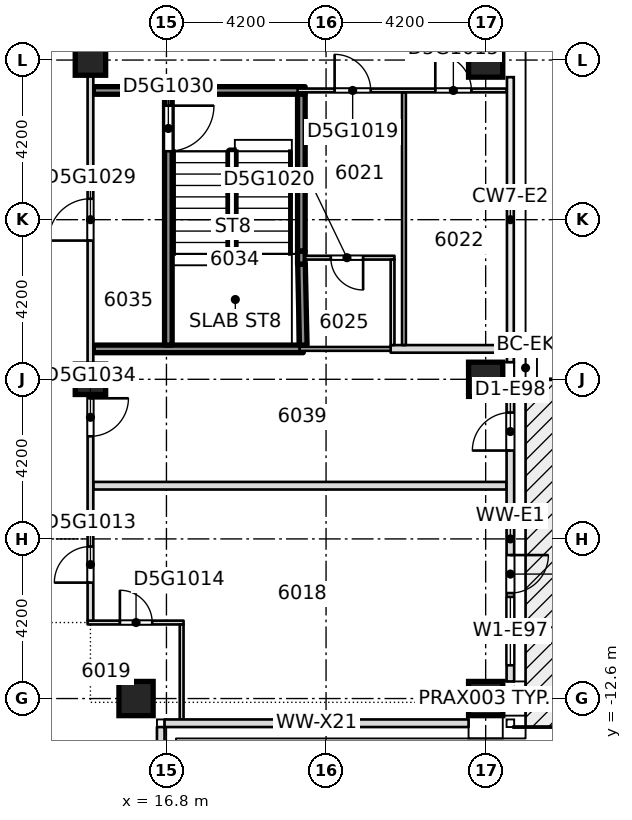
"""IFC4 building model, lengths in metres.
Left out: names, types, materials, properties, quantities, classifications, styles, units other than length and angle.
Written with IfcOpenShell. Run it as: python <this file> out.ifc"""

import sys

from ifc_helpers import new_model, si_unit, direction, frame, frame_2d, origin, origin_2d, place, context, subcontext, project, spatial, rectangle, extrude, element, fill, save


model = new_model("IFC4")
c1 = context("Model", 3, precision=1e-05, world=origin(), true_north=direction((0.0, 1.0)))
c2 = subcontext(c1, "Body", "Model", "MODEL_VIEW")
j1 = project(units=[si_unit("LENGTHUNIT", "METRE"), si_unit("PLANEANGLEUNIT", "RADIAN")], contexts=[c1])
p1 = place(None, origin())
s1 = spatial("IfcSite", under=j1, at=p1, CompositionType="ELEMENT")
p2 = place(p1, origin())
s2 = spatial("IfcBuilding", under=s1, at=p2, CompositionType="ELEMENT")
p3 = place(p2, frame((0.0, 0.0, 230.35)))
s3 = spatial("IfcBuildingStorey", under=s2, at=p3, CompositionType="ELEMENT", Elevation=230.35)
for number, where, z_axis, x_axis in (
    (1, (16.0, -12.6, -0.4), (0.0, 0.0, 1.0), (1.0, 0.0, 0.0)),
    (2, (25.2, -12.6, -0.4), (0.0, 0.0, 1.0), (1.0, 0.0, 0.0)),
    (3, (25.2, -4.2, -0.4), (0.0, 0.0, 1.0), (1.0, 0.0, 0.0)),
    (4, (25.2, 4.2, -0.4), (0.0, 0.0, 1.0), (1.0, 0.0, 0.0)),
):
    element("IfcColumn", number, at=place(p3, frame(where, z_axis=z_axis, x_axis=x_axis)), inside=s3, PredefinedType="COLUMN", context=c2, shape_type="SweptSolid", body=[
        extrude(rectangle(XDim=0.9, YDim=0.9, at=origin_2d()), origin(), (0.0, 0.0, 1.0), 3.45),
    ])
for number, where, z_axis, x_axis in (
    (5, (14.8, -4.2, -0.4), (0.0, 0.0, 1.0), (1.0, 0.0, 0.0)),
    (6, (14.8, 4.2, -0.4), (0.0, 0.0, 1.0), (1.0, 0.0, 0.0)),
):
    element("IfcColumn", number, at=place(p3, frame(where, z_axis=z_axis, x_axis=x_axis)), inside=s3, PredefinedType="COLUMN", context=c2, shape_type="SweptSolid", body=[
        extrude(rectangle(XDim=0.8, YDim=0.8, at=origin_2d()), origin(), (0.0, 0.0, 1.0), 3.45),
    ])
p4 = place(p3, frame((14.725, -10.6, 0.0), z_axis=(0.0, 0.0, 1.0), x_axis=(1.0, 0.0, 0.0)))
e7 = element("IfcWall", 7, at=p4, inside=s3, PredefinedType="PARTITIONING", context=c2, shape_type="SweptSolid", body=[
    extrude(rectangle(XDim=2.525, YDim=0.1, at=frame_2d((1.262, 0.0))), origin(), (0.0, 0.0, 1.0), 3.05),
])
p5 = place(p4, frame((0.85, 0.0, 0.0)))
e8 = element("IfcOpeningElement", 8, at=p5, cuts=e7, PredefinedType="OPENING", context=c2, shape_type="SweptSolid", body=[
    extrude(rectangle(XDim=0.85, YDim=2.1, at=frame_2d((0.425, 1.05))), frame((0.0, 0.06, 0.0), z_axis=(0.0, -1.0, 0.0), x_axis=(1.0, 0.0, 0.0)), (0.0, 0.0, 1.0), 0.12),
])
p6 = place(p3, frame((14.875, -7.0, 0.0), z_axis=(0.0, 0.0, 1.0), x_axis=(1.0, 0.0, 0.0)))
e9 = element("IfcWall", 9, at=p6, inside=s3, PredefinedType="PARTITIONING", context=c2, shape_type="SweptSolid", body=[
    extrude(rectangle(XDim=10.875, YDim=0.2, at=frame_2d((5.438, 0.0))), origin(), (0.0, 0.0, 1.0), 3.05),
])
p7 = place(p3, frame((14.875, -3.4, 0.0), z_axis=(0.0, 0.0, 1.0), x_axis=(1.0, 0.0, 0.0)))
e10 = element("IfcWall", 10, at=p7, inside=s3, PredefinedType="SOLIDWALL", context=c2, shape_type="SweptSolid", body=[
    extrude(rectangle(XDim=5.525, YDim=0.2, at=frame_2d((2.762, 0.0))), origin(), (0.0, 0.0, 1.0), 3.05),
])
p8 = place(p3, frame((20.3, -3.4, 0.0), z_axis=(0.0, 0.0, 1.0), x_axis=(1.0, 0.0, 0.0)))
e11 = element("IfcWall", 11, at=p8, inside=s3, PredefinedType="PARTITIONING", context=c2, shape_type="SweptSolid", body=[
    extrude(rectangle(XDim=2.5, YDim=0.1, at=frame_2d((1.25, 0.0))), origin(), (0.0, 0.0, 1.0), 3.05),
])
p9 = place(p3, frame((22.7, -3.4, 0.0), z_axis=(0.0, 0.0, 1.0), x_axis=(1.0, 0.0, 0.0)))
e12 = element("IfcWall", 12, at=p9, inside=s3, PredefinedType="PARTITIONING", context=c2, shape_type="SweptSolid", body=[
    extrude(rectangle(XDim=3.05, YDim=0.2, at=frame_2d((1.525, 0.0))), origin(), (0.0, 0.0, 1.0), 3.05),
])
p10 = place(p3, frame((20.45, -1.0, 0.0), z_axis=(0.0, 0.0, 1.0), x_axis=(1.0, 0.0, 0.0)))
e13 = element("IfcWall", 13, at=p10, inside=s3, PredefinedType="PARTITIONING", context=c2, shape_type="SweptSolid", body=[
    extrude(rectangle(XDim=2.35, YDim=0.1, at=frame_2d((1.175, 0.0))), origin(), (0.0, 0.0, 1.0), 3.05),
])
p11 = place(p10, frame((0.675, 0.0, 0.0)))
e14 = element("IfcOpeningElement", 14, at=p11, cuts=e13, PredefinedType="OPENING", context=c2, shape_type="SweptSolid", body=[
    extrude(rectangle(XDim=0.85, YDim=2.1, at=frame_2d((0.425, 1.05))), frame((0.0, 0.06, 0.0), z_axis=(0.0, -1.0, 0.0), x_axis=(1.0, 0.0, 0.0)), (0.0, 0.0, 1.0), 0.12),
])
p12 = place(p3, frame((14.875, 3.4, 0.0), z_axis=(0.0, 0.0, 1.0), x_axis=(1.0, 0.0, 0.0)))
e15 = element("IfcWall", 15, at=p12, inside=s3, PredefinedType="SOLIDWALL", context=c2, shape_type="SweptSolid", body=[
    extrude(rectangle(XDim=5.575, YDim=0.2, at=frame_2d((2.788, 0.0))), origin(), (0.0, 0.0, 1.0), 3.05),
])
p13 = place(p3, frame((20.25, 3.4, 0.0), z_axis=(0.0, 0.0, 1.0), x_axis=(1.0, 0.0, 0.0)))
e16 = element("IfcWall", 16, at=p13, inside=s3, PredefinedType="PARTITIONING", context=c2, shape_type="SweptSolid", body=[
    extrude(rectangle(XDim=5.5, YDim=0.1, at=frame_2d((2.75, 0.0))), origin(), (0.0, 0.0, 1.0), 3.05),
])
p14 = place(p13, frame((3.625, 0.0, 0.0)))
e17 = element("IfcOpeningElement", 17, at=p14, cuts=e16, PredefinedType="OPENING", context=c2, shape_type="SweptSolid", body=[
    extrude(rectangle(XDim=0.95, YDim=2.1, at=frame_2d((0.475, 1.05))), frame((0.0, 0.06, 0.0), z_axis=(0.0, -1.0, 0.0), x_axis=(1.0, 0.0, 0.0)), (0.0, 0.0, 1.0), 0.12),
])
p15 = place(p13, frame((0.975, 0.0, 0.0)))
e18 = element("IfcOpeningElement", 18, at=p15, cuts=e16, PredefinedType="OPENING", context=c2, shape_type="SweptSolid", body=[
    extrude(rectangle(XDim=0.95, YDim=2.1, at=frame_2d((0.475, 1.05))), frame((0.0, 0.06, 0.0), z_axis=(0.0, -1.0, 0.0), x_axis=(1.0, 0.0, 0.0)), (0.0, 0.0, 1.0), 0.12),
])
p16 = place(p3, frame((14.8, -10.55, 0.0), z_axis=(0.0, 0.0, 1.0), x_axis=(0.0, 1.0, 0.0)))
e19 = element("IfcWall", 19, at=p16, inside=s3, PredefinedType="PARTITIONING", context=c2, shape_type="SweptSolid", body=[
    extrude(rectangle(XDim=20.975, YDim=0.15, at=frame_2d((10.488, 0.0))), origin(), (0.0, 0.0, 1.0), 3.05),
])
p17 = place(p16, frame((1.0, 0.0, 0.0)))
e20 = element("IfcOpeningElement", 20, at=p17, cuts=e19, PredefinedType="OPENING", context=c2, shape_type="SweptSolid", body=[
    extrude(rectangle(XDim=0.95, YDim=2.1, at=frame_2d((0.475, 1.05))), frame((0.0, 0.085, 0.0), z_axis=(0.0, -1.0, 0.0), x_axis=(1.0, 0.0, 0.0)), (0.0, 0.0, 1.0), 0.17),
])
p18 = place(p16, frame((17.0, 0.0, 0.0)))
e21 = element("IfcOpeningElement", 21, at=p18, cuts=e19, PredefinedType="OPENING", context=c2, shape_type="SweptSolid", body=[
    extrude(rectangle(XDim=1.0, YDim=2.1, at=frame_2d((0.5, 1.05))), frame((0.0, 0.085, 0.0), z_axis=(0.0, -1.0, 0.0), x_axis=(1.0, 0.0, 0.0)), (0.0, 0.0, 1.0), 0.17),
])
p19 = place(p16, frame((10.0, 0.0, 0.0)))
e22 = element("IfcOpeningElement", 22, at=p19, cuts=e19, PredefinedType="OPENING", context=c2, shape_type="SweptSolid", body=[
    extrude(rectangle(XDim=1.1, YDim=2.1, at=frame_2d((0.55, 1.05))), frame((0.0, 0.085, 0.0), z_axis=(0.0, -1.0, 0.0), x_axis=(1.0, 0.0, 0.0)), (0.0, 0.0, 1.0), 0.17),
])
p20 = place(p16, frame((4.85, 0.0, 0.0)))
e23 = element("IfcOpeningElement", 23, at=p20, cuts=e19, PredefinedType="OPENING", context=c2, shape_type="SweptSolid", body=[
    extrude(rectangle(XDim=1.0, YDim=2.1, at=frame_2d((0.5, 1.05))), frame((0.0, 0.085, 0.0), z_axis=(0.0, -1.0, 0.0), x_axis=(1.0, 0.0, 0.0)), (0.0, 0.0, 1.0), 0.17),
])
p21 = place(p3, frame((16.85, -3.3, 0.0), z_axis=(0.0, 0.0, 1.0), x_axis=(0.0, 1.0, 0.0)))
e24 = element("IfcWall", 24, at=p21, inside=s3, PredefinedType="SOLIDWALL", context=c2, shape_type="SweptSolid", body=[
    extrude(rectangle(XDim=6.6, YDim=0.2, at=frame_2d((3.3, 0.0))), origin(), (0.0, 0.0, 1.0), 3.05),
])
p22 = place(p21, frame((5.1, 0.0, 0.0)))
e25 = element("IfcOpeningElement", 25, at=p22, cuts=e24, PredefinedType="OPENING", context=c2, shape_type="SweptSolid", body=[
    extrude(rectangle(XDim=1.2, YDim=2.1, at=frame_2d((0.6, 1.05))), frame((0.0, 0.11, 0.0), z_axis=(0.0, -1.0, 0.0), x_axis=(1.0, 0.0, 0.0)), (0.0, 0.0, 1.0), 0.22),
])
p23 = place(p3, frame((17.2, -13.15, 0.0), z_axis=(0.0, 0.0, 1.0), x_axis=(0.0, 1.0, 0.0)))
e26 = element("IfcWall", 26, at=p23, inside=s3, PredefinedType="PARTITIONING", context=c2, shape_type="SweptSolid", body=[
    extrude(rectangle(XDim=2.5, YDim=0.1, at=frame_2d((1.25, 0.0))), origin(), (0.0, 0.0, 1.0), 3.05),
])
p24 = place(p3, frame((20.4, -3.3, 0.0), z_axis=(0.0, 0.0, 1.0), x_axis=(-0.021771342749, 0.999762976227, 0.0)))
e27 = element("IfcWall", 27, at=p24, inside=s3, PredefinedType="SOLIDWALL", context=c2, shape_type="SweptSolid", body=[
    extrude(rectangle(XDim=2.131, YDim=0.2, at=frame_2d((1.065, 0.0))), origin(), (0.0, 0.0, 1.0), 3.05),
])
p25 = place(p3, frame((20.35, -0.83, 0.0), z_axis=(0.0, 0.0, 1.0), x_axis=(0.0, 1.0, 0.0)))
e28 = element("IfcWall", 28, at=p25, inside=s3, PredefinedType="SOLIDWALL", context=c2, shape_type="SweptSolid", body=[
    extrude(rectangle(XDim=4.13, YDim=0.2, at=frame_2d((2.065, 0.0))), origin(), (0.0, 0.0, 1.0), 3.05),
])
p26 = place(p3, frame((22.75, -3.3, 0.0), z_axis=(0.0, 0.0, 1.0), x_axis=(0.0, 1.0, 0.0)))
e29 = element("IfcWall", 29, at=p26, inside=s3, PredefinedType="PARTITIONING", context=c2, shape_type="SweptSolid", body=[
    extrude(rectangle(XDim=2.25, YDim=0.1, at=frame_2d((1.125, 0.0))), origin(), (0.0, 0.0, 1.0), 3.05),
])
p27 = place(p3, frame((23.05, -3.3, 0.0), z_axis=(0.0, 0.0, 1.0), x_axis=(0.0, 1.0, 0.0)))
e30 = element("IfcWall", 30, at=p27, inside=s3, PredefinedType="PARTITIONING", context=c2, shape_type="SweptSolid", body=[
    extrude(rectangle(XDim=6.65, YDim=0.1, at=frame_2d((3.325, 0.0))), origin(), (0.0, 0.0, 1.0), 3.05),
])
p28 = place(p3, frame((16.65, -20.55, 0.0), z_axis=(0.0, 0.0, 1.0), x_axis=(0.0, 1.0, 0.0)))
e31 = element("IfcWall", 31, at=p28, inside=s3, PredefinedType="STANDARD", context=c2, shape_type="SweptSolid", body=[
    extrude(rectangle(XDim=7.2, YDim=0.2, at=frame_2d((3.6, 0.0))), origin(), (0.0, 0.0, 1.0), 3.05),
])
p29 = place(p28, frame((0.425, 0.0, 0.2)))
e32 = element("IfcOpeningElement", 32, at=p29, cuts=e31, PredefinedType="OPENING", context=c2, shape_type="SweptSolid", body=[
    extrude(rectangle(XDim=1.8, YDim=2.65, at=frame_2d((0.9, 1.325))), frame((0.0, 0.11, 0.0), z_axis=(0.0, -1.0, 0.0), x_axis=(1.0, 0.0, 0.0)), (0.0, 0.0, 1.0), 0.22),
])
p30 = place(p28, frame((4.025, 0.0, 0.2)))
e33 = element("IfcOpeningElement", 33, at=p30, cuts=e31, PredefinedType="OPENING", context=c2, shape_type="SweptSolid", body=[
    extrude(rectangle(XDim=1.8, YDim=2.65, at=frame_2d((0.9, 1.325))), frame((0.0, 0.11, 0.0), z_axis=(0.0, -1.0, 0.0), x_axis=(1.0, 0.0, 0.0)), (0.0, 0.0, 1.0), 0.22),
])
p31 = place(p3, frame((16.75, -13.25, 0.0), z_axis=(0.0, 0.0, 1.0), x_axis=(1.0, 0.0, 0.0)))
e34 = element("IfcWall", 34, at=p31, inside=s3, PredefinedType="STANDARD", context=c2, shape_type="SweptSolid", body=[
    extrude(rectangle(XDim=8.0, YDim=0.2, at=frame_2d((4.0, 0.0))), origin(), (0.0, 0.0, 1.0), 3.05),
])
p32 = place(p3, frame((25.85, -12.15, 0.0), z_axis=(0.0, 0.0, 1.0), x_axis=(0.0, 1.0, 0.0)))
e35 = element("IfcWall", 35, at=p32, inside=s3, PredefinedType="STANDARD", context=c2, shape_type="SweptSolid", body=[
    extrude(rectangle(XDim=7.5, YDim=0.2, at=frame_2d((3.75, 0.0))), origin(), (0.0, 0.0, 1.0), 3.05),
])
p33 = place(p32, frame((0.425, 0.0, 0.2)))
e36 = element("IfcOpeningElement", 36, at=p33, cuts=e35, PredefinedType="OPENING", context=c2, shape_type="SweptSolid", body=[
    extrude(rectangle(XDim=1.8, YDim=2.65, at=frame_2d((0.9, 1.325))), frame((0.0, 0.11, 0.0), z_axis=(0.0, -1.0, 0.0), x_axis=(1.0, 0.0, 0.0)), (0.0, 0.0, 1.0), 0.22),
])
p34 = place(p32, frame((2.325, 0.0, 0.0)))
e37 = element("IfcOpeningElement", 37, at=p34, cuts=e35, PredefinedType="OPENING", context=c2, shape_type="SweptSolid", body=[
    extrude(rectangle(XDim=1.0, YDim=2.4, at=frame_2d((0.5, 1.2))), frame((0.0, 0.11, 0.0), z_axis=(0.0, -1.0, 0.0), x_axis=(1.0, 0.0, 0.0)), (0.0, 0.0, 1.0), 0.22),
])
p35 = place(p32, frame((6.075, 0.0, 0.0)))
e38 = element("IfcOpeningElement", 38, at=p35, cuts=e35, PredefinedType="OPENING", context=c2, shape_type="SweptSolid", body=[
    extrude(rectangle(XDim=1.0, YDim=2.4, at=frame_2d((0.5, 1.2))), frame((0.0, 0.11, 0.0), z_axis=(0.0, -1.0, 0.0), x_axis=(1.0, 0.0, 0.0)), (0.0, 0.0, 1.0), 0.22),
])
p36 = place(p3, frame((20.35, -1.17, 0.0), z_axis=(0.0, 0.0, 1.0), x_axis=(0.0, 1.0, 0.0)))
e39 = element("IfcWall", 39, at=p36, inside=s3, PredefinedType="SOLIDWALL", context=c2, shape_type="SweptSolid", body=[
    extrude(rectangle(XDim=0.34, YDim=0.2, at=frame_2d((0.17, 0.0))), origin(), (0.0, 0.0, 1.0), 3.05),
])
p37 = place(p17, origin())
e40 = element("IfcDoor", 40, at=p37, inside=s3, OperationType="SINGLE_SWING_RIGHT", PredefinedType="DOOR", context=c2, shape_type="SweptSolid", body=[
    extrude(rectangle(XDim=0.95, YDim=2.1, at=frame_2d((0.475, 1.05))), frame((0.0, 0.025, 0.0), z_axis=(0.0, -1.0, 0.0), x_axis=(1.0, 0.0, 0.0)), (0.0, 0.0, 1.0), 0.05),
])
fill(e20, e40)
p38 = place(p5, origin())
e41 = element("IfcDoor", 41, at=p38, inside=s3, OperationType="SINGLE_SWING_RIGHT", PredefinedType="DOOR", context=c2, shape_type="SweptSolid", body=[
    extrude(rectangle(XDim=0.85, YDim=2.1, at=frame_2d((0.425, 1.05))), frame((0.0, 0.025, 0.0), z_axis=(0.0, -1.0, 0.0), x_axis=(1.0, 0.0, 0.0)), (0.0, 0.0, 1.0), 0.05),
])
fill(e8, e41)
p39 = place(p14, origin())
e42 = element("IfcDoor", 42, at=p39, inside=s3, OperationType="SINGLE_SWING_LEFT", PredefinedType="DOOR", context=c2, shape_type="SweptSolid", body=[
    extrude(rectangle(XDim=0.95, YDim=2.1, at=frame_2d((0.475, 1.05))), frame((0.0, 0.025, 0.0), z_axis=(0.0, -1.0, 0.0), x_axis=(1.0, 0.0, 0.0)), (0.0, 0.0, 1.0), 0.05),
])
fill(e17, e42)
p40 = place(p15, origin())
e43 = element("IfcDoor", 43, at=p40, inside=s3, OperationType="SINGLE_SWING_RIGHT", PredefinedType="DOOR", context=c2, shape_type="SweptSolid", body=[
    extrude(rectangle(XDim=0.95, YDim=2.1, at=frame_2d((0.475, 1.05))), frame((0.0, 0.025, 0.0), z_axis=(0.0, -1.0, 0.0), x_axis=(1.0, 0.0, 0.0)), (0.0, 0.0, 1.0), 0.05),
])
fill(e18, e43)
p41 = place(p11, origin())
e44 = element("IfcDoor", 44, at=p41, inside=s3, OperationType="SINGLE_SWING_RIGHT", PredefinedType="DOOR", context=c2, shape_type="SweptSolid", body=[
    extrude(rectangle(XDim=0.85, YDim=2.1, at=frame_2d((0.425, 1.05))), frame((0.0, 0.025, 0.0), z_axis=(0.0, -1.0, 0.0), x_axis=(1.0, 0.0, 0.0)), (0.0, 0.0, 1.0), 0.05),
])
fill(e14, e44)
p42 = place(p19, origin())
e45 = element("IfcDoor", 45, at=p42, inside=s3, OperationType="SINGLE_SWING_LEFT", PredefinedType="DOOR", context=c2, shape_type="SweptSolid", body=[
    extrude(rectangle(XDim=1.1, YDim=2.1, at=frame_2d((0.55, 1.05))), frame((0.0, 0.025, 0.0), z_axis=(0.0, -1.0, 0.0), x_axis=(1.0, 0.0, 0.0)), (0.0, 0.0, 1.0), 0.05),
])
fill(e22, e45)
p43 = place(p22, origin())
e46 = element("IfcDoor", 46, at=p43, inside=s3, OperationType="SINGLE_SWING_LEFT", PredefinedType="DOOR", context=c2, shape_type="SweptSolid", body=[
    extrude(rectangle(XDim=1.2, YDim=2.1, at=frame_2d((0.6, 1.05))), frame((0.0, 0.025, 0.0), z_axis=(0.0, -1.0, 0.0), x_axis=(1.0, 0.0, 0.0)), (0.0, 0.0, 1.0), 0.05),
])
fill(e25, e46)
p44 = place(p20, origin())
e47 = element("IfcDoor", 47, at=p44, inside=s3, OperationType="SINGLE_SWING_LEFT", PredefinedType="DOOR", context=c2, shape_type="SweptSolid", body=[
    extrude(rectangle(XDim=1.0, YDim=2.1, at=frame_2d((0.5, 1.05))), frame((0.0, 0.025, 0.0), z_axis=(0.0, -1.0, 0.0), x_axis=(1.0, 0.0, 0.0)), (0.0, 0.0, 1.0), 0.05),
])
fill(e23, e47)
p45 = place(p33, origin())
e48 = element("IfcWindow", 48, at=p45, inside=s3, PartitioningType="SINGLE_PANEL", PredefinedType="WINDOW", context=c2, shape_type="SweptSolid", body=[
    extrude(rectangle(XDim=1.8, YDim=2.65, at=frame_2d((0.9, 1.325))), frame((0.0, 0.03, 0.0), z_axis=(0.0, -1.0, 0.0), x_axis=(1.0, 0.0, 0.0)), (0.0, 0.0, 1.0), 0.06),
])
fill(e36, e48)
p46 = place(p34, origin())
e49 = element("IfcDoor", 49, at=p46, inside=s3, OperationType="SINGLE_SWING_LEFT", PredefinedType="DOOR", context=c2, shape_type="SweptSolid", body=[
    extrude(rectangle(XDim=1.0, YDim=2.4, at=frame_2d((0.5, 1.2))), frame((0.0, 0.025, 0.0), z_axis=(0.0, -1.0, 0.0), x_axis=(1.0, 0.0, 0.0)), (0.0, 0.0, 1.0), 0.05),
])
fill(e37, e49)
p47 = place(p35, origin())
e50 = element("IfcDoor", 50, at=p47, inside=s3, OperationType="SINGLE_SWING_LEFT", PredefinedType="DOOR", context=c2, shape_type="SweptSolid", body=[
    extrude(rectangle(XDim=1.0, YDim=2.4, at=frame_2d((0.5, 1.2))), frame((0.0, 0.025, 0.0), z_axis=(0.0, -1.0, 0.0), x_axis=(1.0, 0.0, 0.0)), (0.0, 0.0, 1.0), 0.05),
])
fill(e38, e50)
save(model, sys.argv[1])
